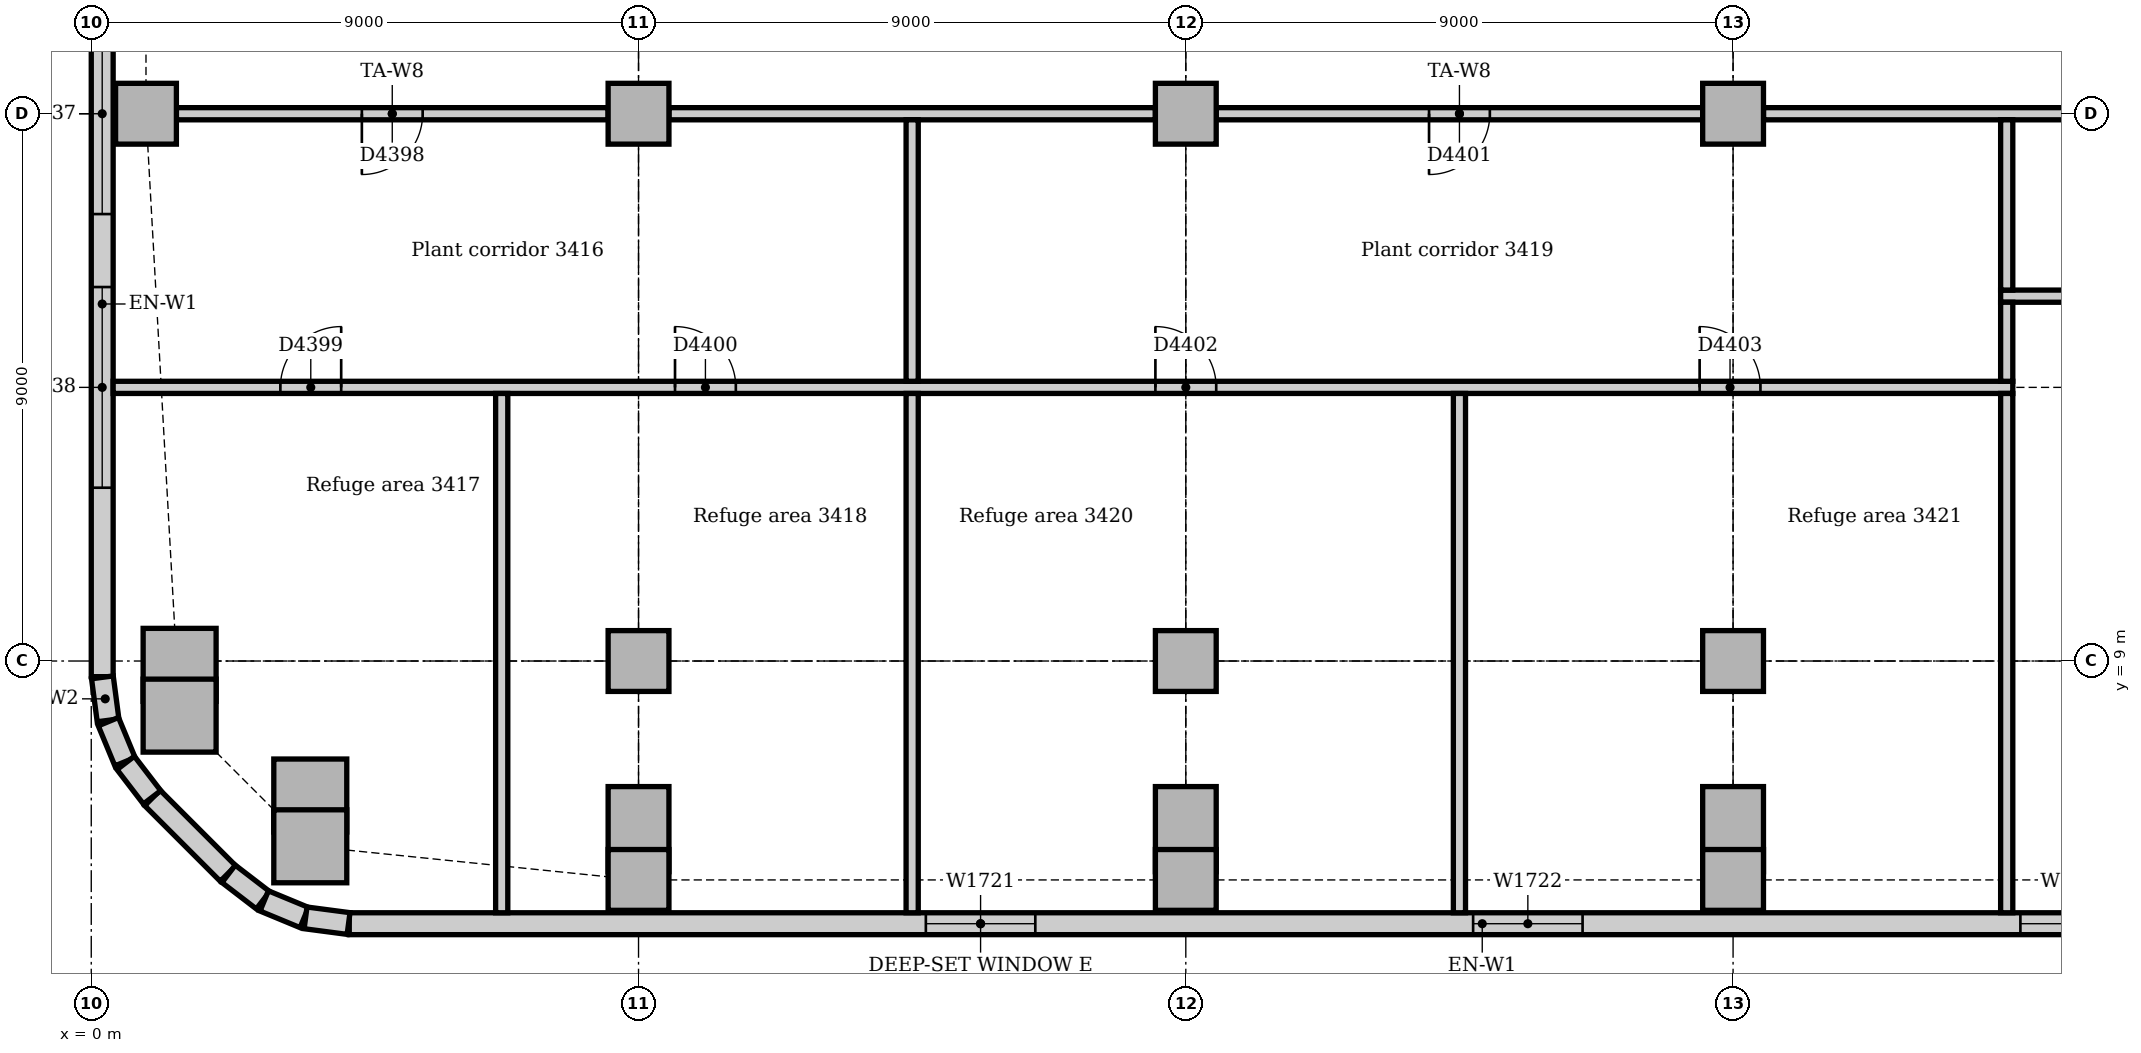
"""IFC4 building model, lengths in metres.
Left out: names, types, materials, properties, quantities, classifications, styles, units other than length and angle.
Written with IfcOpenShell. Run it as: python <this file> out.ifc"""

import sys

from ifc_helpers import new_model, si_unit, direction, frame, frame_2d, origin, origin_2d, place, context, subcontext, project, spatial, rectangle, extrude, element, fill, save


model = new_model("IFC4")
c1 = context("Model", 3, precision=1e-05, world=origin(), true_north=direction((0.0, 1.0)))
c2 = subcontext(c1, "Body", "Model", "MODEL_VIEW")
j1 = project(units=[si_unit("LENGTHUNIT", "METRE"), si_unit("PLANEANGLEUNIT", "RADIAN")], contexts=[c1])
p1 = place(None, origin())
s1 = spatial("IfcSite", under=j1, at=p1, CompositionType="ELEMENT")
p2 = place(p1, origin())
s2 = spatial("IfcBuilding", under=s1, at=p2, CompositionType="ELEMENT")
p3 = place(p2, frame((0.0, 0.0, 144.0)))
s3 = spatial("IfcBuildingStorey", under=s2, at=p3, CompositionType="ELEMENT", Elevation=144.0)
for number, where, z_axis, x_axis in (
    (1, (3.602, 5.953, 0.0), (0.0, 0.0, 1.0), (1.0, 0.0, 0.0)),
    (2, (1.453, 8.102, 0.0), (0.0, 0.0, 1.0), (1.0, 0.0, 0.0)),
):
    element("IfcColumn", number, at=place(p3, frame(where, z_axis=z_axis, x_axis=x_axis)), inside=s3, PredefinedType="COLUMN", context=c2, shape_type="SweptSolid", body=[
        extrude(rectangle(XDim=1.2, YDim=1.2, at=origin_2d()), origin(), (0.0, 0.0, 1.0), 4.85),
    ])
for number, where, z_axis, x_axis in (
    (3, (9.0, 5.4, 0.0), (0.0, 0.0, 1.0), (1.0, 0.0, 0.0)),
    (4, (18.0, 5.4, 0.0), (0.0, 0.0, 1.0), (1.0, 0.0, 0.0)),
    (5, (27.0, 5.4, 0.0), (0.0, 0.0, 1.0), (1.0, 0.0, 0.0)),
    (6, (0.9, 18.0, 0.0), (0.0, 0.0, 1.0), (1.0, 0.0, 0.0)),
    (7, (9.0, 9.0, 0.0), (0.0, 0.0, 1.0), (1.0, 0.0, 0.0)),
    (8, (9.0, 18.0, 0.0), (0.0, 0.0, 1.0), (1.0, 0.0, 0.0)),
    (9, (18.0, 9.0, 0.0), (0.0, 0.0, 1.0), (1.0, 0.0, 0.0)),
    (10, (18.0, 18.0, 0.0), (0.0, 0.0, 1.0), (1.0, 0.0, 0.0)),
    (11, (27.0, 9.0, 0.0), (0.0, 0.0, 1.0), (1.0, 0.0, 0.0)),
    (12, (27.0, 18.0, 0.0), (0.0, 0.0, 1.0), (1.0, 0.0, 0.0)),
):
    element("IfcColumn", number, at=place(p3, frame(where, z_axis=z_axis, x_axis=x_axis)), inside=s3, PredefinedType="COLUMN", context=c2, shape_type="SweptSolid", body=[
        extrude(rectangle(XDim=1.0, YDim=1.0, at=origin_2d()), origin(), (0.0, 0.0, 1.0), 4.85),
    ])
p4 = place(p3, frame((4.243, 4.68, 0.0), z_axis=(0.0, 0.0, 1.0), x_axis=(1.0, 0.0, 0.0)))
e13 = element("IfcWall", 13, at=p4, inside=s3, PredefinedType="STANDARD", context=c2, shape_type="SweptSolid", body=[
    extrude(rectangle(XDim=37.265, YDim=0.36, at=frame_2d((18.632, 0.0))), origin(), (0.0, 0.0, 1.0), 4.85),
])
p5 = place(p4, frame((9.482, 0.0, 0.9)))
e14 = element("IfcOpeningElement", 14, at=p5, cuts=e13, PredefinedType="OPENING", context=c2, shape_type="SweptSolid", body=[
    extrude(rectangle(XDim=1.8, YDim=2.2, at=frame_2d((0.9, 1.1))), frame((0.0, 0.19, 0.0), z_axis=(0.0, -1.0, 0.0), x_axis=(1.0, 0.0, 0.0)), (0.0, 0.0, 1.0), 0.38),
])
p6 = place(p4, frame((18.482, 0.0, 0.9)))
e15 = element("IfcOpeningElement", 15, at=p6, cuts=e13, PredefinedType="OPENING", context=c2, shape_type="SweptSolid", body=[
    extrude(rectangle(XDim=1.8, YDim=2.2, at=frame_2d((0.9, 1.1))), frame((0.0, 0.19, 0.0), z_axis=(0.0, -1.0, 0.0), x_axis=(1.0, 0.0, 0.0)), (0.0, 0.0, 1.0), 0.38),
])
p7 = place(p4, frame((27.482, 0.0, 0.9)))
e16 = element("IfcOpeningElement", 16, at=p7, cuts=e13, PredefinedType="OPENING", context=c2, shape_type="SweptSolid", body=[
    extrude(rectangle(XDim=1.8, YDim=2.2, at=frame_2d((0.9, 1.1))), frame((0.0, 0.19, 0.0), z_axis=(0.0, -1.0, 0.0), x_axis=(1.0, 0.0, 0.0)), (0.0, 0.0, 1.0), 0.38),
])
p8 = place(p4, frame((30.482, 0.0, 0.9)))
e17 = element("IfcOpeningElement", 17, at=p8, cuts=e13, PredefinedType="OPENING", context=c2, shape_type="SweptSolid", body=[
    extrude(rectangle(XDim=3.3, YDim=2.2, at=frame_2d((1.65, 1.1))), frame((0.0, 0.19, 0.0), z_axis=(0.0, -1.0, 0.0), x_axis=(1.0, 0.0, 0.0)), (0.0, 0.0, 1.0), 0.38),
])
p9 = place(p3, frame((0.18, 21.0, 0.0), z_axis=(0.0, 0.0, 1.0), x_axis=(0.0, -1.0, 0.0)))
e18 = element("IfcWall", 18, at=p9, inside=s3, PredefinedType="STANDARD", context=c2, shape_type="SweptSolid", body=[
    extrude(rectangle(XDim=12.257, YDim=0.36, at=frame_2d((6.129, 0.0))), origin(), (0.0, 0.0, 1.0), 4.85),
])
p10 = place(p9, frame((1.35, 0.0, 0.9)))
e19 = element("IfcOpeningElement", 19, at=p10, cuts=e18, PredefinedType="OPENING", context=c2, shape_type="SweptSolid", body=[
    extrude(rectangle(XDim=3.3, YDim=2.2, at=frame_2d((1.65, 1.1))), frame((0.0, 0.19, 0.0), z_axis=(0.0, -1.0, 0.0), x_axis=(1.0, 0.0, 0.0)), (0.0, 0.0, 1.0), 0.38),
])
p11 = place(p9, frame((5.85, 0.0, 0.9)))
e20 = element("IfcOpeningElement", 20, at=p11, cuts=e18, PredefinedType="OPENING", context=c2, shape_type="SweptSolid", body=[
    extrude(rectangle(XDim=3.3, YDim=2.2, at=frame_2d((1.65, 1.1))), frame((0.0, 0.19, 0.0), z_axis=(0.0, -1.0, 0.0), x_axis=(1.0, 0.0, 0.0)), (0.0, 0.0, 1.0), 0.38),
])
p12 = place(p3, frame((1.006, 6.749, 0.0), z_axis=(0.0, 0.0, 1.0), x_axis=(0.707106781187, -0.707106781187, 0.0)))
e21 = element("IfcWall", 21, at=p12, inside=s3, PredefinedType="STANDARD", context=c2, shape_type="SweptSolid", body=[
    extrude(rectangle(XDim=1.757, YDim=0.36, at=frame_2d((0.879, 0.0))), origin(), (0.0, 0.0, 1.0), 4.85),
])
for number, where, z_axis, x_axis in (
    (22, (0.183, 8.731, 0.0), (0.0, 0.0, 1.0), (0.131, -0.991, 0.0)),
    (23, (0.282, 8.003, 0.0), (0.0, 0.0, 1.0), (0.383, -0.924, 0.0)),
):
    element("IfcWall", number, at=place(p3, frame(where, z_axis=z_axis, x_axis=x_axis)), inside=s3, PredefinedType="STANDARD", context=c2, shape_type="SweptSolid", body=[
        extrude(rectangle(XDim=0.713, YDim=0.36, at=frame_2d((0.356, 0.0))), origin(), (0.0, 0.0, 1.0), 4.85),
    ])
for number, where, z_axis, x_axis in (
    (24, (0.566, 7.324, 0.0), (0.0, 0.0, 1.0), (0.609, -0.793, 0.0)),
    (25, (2.259, 5.5, 0.0), (0.0, 0.0, 1.0), (0.793, -0.609, 0.0)),
):
    element("IfcWall", number, at=place(p3, frame(where, z_axis=z_axis, x_axis=x_axis)), inside=s3, PredefinedType="STANDARD", context=c2, shape_type="SweptSolid", body=[
        extrude(rectangle(XDim=0.713, YDim=0.36, at=frame_2d((0.357, 0.0))), origin(), (0.0, 0.0, 1.0), 4.85),
    ])
for number, where, z_axis, x_axis in (
    (26, (2.844, 5.055, 0.0), (0.0, 0.0, 1.0), (0.924, -0.383, 0.0)),
    (27, (3.524, 4.776, 0.0), (0.0, 0.0, 1.0), (0.991, -0.131, 0.0)),
):
    element("IfcWall", number, at=place(p3, frame(where, z_axis=z_axis, x_axis=x_axis)), inside=s3, PredefinedType="STANDARD", context=c2, shape_type="SweptSolid", body=[
        extrude(rectangle(XDim=0.713, YDim=0.36, at=frame_2d((0.356, 0.0))), origin(), (0.0, 0.0, 1.0), 4.85),
    ])
p13 = place(p3, frame((27.5, 18.0, 0.0), z_axis=(0.0, 0.0, 1.0), x_axis=(1.0, 0.0, 0.0)))
e28 = element("IfcWall", 28, at=p13, inside=s3, PredefinedType="PARTITIONING", context=c2, shape_type="SweptSolid", body=[
    extrude(rectangle(XDim=8.0, YDim=0.2, at=frame_2d((4.0, 0.0))), origin(), (0.0, 0.0, 1.0), 4.262),
])
p14 = place(p3, frame((18.5, 18.0, 0.0), z_axis=(0.0, 0.0, 1.0), x_axis=(1.0, 0.0, 0.0)))
e29 = element("IfcWall", 29, at=p14, inside=s3, PredefinedType="PARTITIONING", context=c2, shape_type="SweptSolid", body=[
    extrude(rectangle(XDim=8.0, YDim=0.2, at=frame_2d((4.0, 0.0))), origin(), (0.0, 0.0, 1.0), 4.262),
])
p15 = place(p14, frame((3.5, 0.0, 0.0)))
e30 = element("IfcOpeningElement", 30, at=p15, cuts=e29, PredefinedType="OPENING", context=c2, shape_type="SweptSolid", body=[
    extrude(rectangle(XDim=1.0, YDim=2.1, at=frame_2d((0.5, 1.05))), frame((0.0, 0.11, 0.0), z_axis=(0.0, -1.0, 0.0), x_axis=(1.0, 0.0, 0.0)), (0.0, 0.0, 1.0), 0.22),
])
p16 = place(p3, frame((9.5, 18.0, 0.0), z_axis=(0.0, 0.0, 1.0), x_axis=(1.0, 0.0, 0.0)))
e31 = element("IfcWall", 31, at=p16, inside=s3, PredefinedType="PARTITIONING", context=c2, shape_type="SweptSolid", body=[
    extrude(rectangle(XDim=8.0, YDim=0.2, at=frame_2d((4.0, 0.0))), origin(), (0.0, 0.0, 1.0), 4.262),
])
p17 = place(p3, frame((1.4, 18.0, 0.0), z_axis=(0.0, 0.0, 1.0), x_axis=(1.0, 0.0, 0.0)))
e32 = element("IfcWall", 32, at=p17, inside=s3, PredefinedType="PARTITIONING", context=c2, shape_type="SweptSolid", body=[
    extrude(rectangle(XDim=7.1, YDim=0.2, at=frame_2d((3.55, 0.0))), origin(), (0.0, 0.0, 1.0), 4.262),
])
p18 = place(p17, frame((3.05, 0.0, 0.0)))
e33 = element("IfcOpeningElement", 33, at=p18, cuts=e32, PredefinedType="OPENING", context=c2, shape_type="SweptSolid", body=[
    extrude(rectangle(XDim=1.0, YDim=2.1, at=frame_2d((0.5, 1.05))), frame((0.0, 0.11, 0.0), z_axis=(0.0, -1.0, 0.0), x_axis=(1.0, 0.0, 0.0)), (0.0, 0.0, 1.0), 0.22),
])
p19 = place(p3, frame((0.36, 13.5, 0.0), z_axis=(0.0, 0.0, 1.0), x_axis=(1.0, 0.0, 0.0)))
e34 = element("IfcWall", 34, at=p19, inside=s3, PredefinedType="PARTITIONING", context=c2, shape_type="SweptSolid", body=[
    extrude(rectangle(XDim=31.24, YDim=0.2, at=frame_2d((15.62, 0.0))), origin(), (0.0, 0.0, 1.0), 4.4),
])
p20 = place(p19, frame((2.75, 0.0, 0.0)))
e35 = element("IfcOpeningElement", 35, at=p20, cuts=e34, PredefinedType="OPENING", context=c2, shape_type="SweptSolid", body=[
    extrude(rectangle(XDim=1.0, YDim=2.1, at=frame_2d((0.5, 1.05))), frame((0.0, 0.11, 0.0), z_axis=(0.0, -1.0, 0.0), x_axis=(1.0, 0.0, 0.0)), (0.0, 0.0, 1.0), 0.22),
])
p21 = place(p19, frame((9.24, 0.0, 0.0)))
e36 = element("IfcOpeningElement", 36, at=p21, cuts=e34, PredefinedType="OPENING", context=c2, shape_type="SweptSolid", body=[
    extrude(rectangle(XDim=1.0, YDim=2.1, at=frame_2d((0.5, 1.05))), frame((0.0, 0.11, 0.0), z_axis=(0.0, -1.0, 0.0), x_axis=(1.0, 0.0, 0.0)), (0.0, 0.0, 1.0), 0.22),
])
p22 = place(p19, frame((17.14, 0.0, 0.0)))
e37 = element("IfcOpeningElement", 37, at=p22, cuts=e34, PredefinedType="OPENING", context=c2, shape_type="SweptSolid", body=[
    extrude(rectangle(XDim=1.0, YDim=2.1, at=frame_2d((0.5, 1.05))), frame((0.0, 0.11, 0.0), z_axis=(0.0, -1.0, 0.0), x_axis=(1.0, 0.0, 0.0)), (0.0, 0.0, 1.0), 0.22),
])
p23 = place(p19, frame((26.09, 0.0, 0.0)))
e38 = element("IfcOpeningElement", 38, at=p23, cuts=e34, PredefinedType="OPENING", context=c2, shape_type="SweptSolid", body=[
    extrude(rectangle(XDim=1.0, YDim=2.1, at=frame_2d((0.5, 1.05))), frame((0.0, 0.11, 0.0), z_axis=(0.0, -1.0, 0.0), x_axis=(1.0, 0.0, 0.0)), (0.0, 0.0, 1.0), 0.22),
])
p24 = place(p3, frame((31.4, 15.0, 0.0), z_axis=(0.0, 0.0, 1.0), x_axis=(1.0, 0.0, 0.0)))
e39 = element("IfcWall", 39, at=p24, inside=s3, PredefinedType="PARTITIONING", context=c2, shape_type="SweptSolid", body=[
    extrude(rectangle(XDim=15.056, YDim=0.2, at=frame_2d((7.528, 0.0))), origin(), (0.0, 0.0, 1.0), 4.85),
])
p25 = place(p24, frame((3.0, 0.0, 0.0)))
e40 = element("IfcOpeningElement", 40, at=p25, cuts=e39, PredefinedType="OPENING", context=c2, shape_type="SweptSolid", body=[
    extrude(rectangle(XDim=1.0, YDim=2.1, at=frame_2d((0.5, 1.05))), frame((0.0, 0.11, 0.0), z_axis=(0.0, -1.0, 0.0), x_axis=(1.0, 0.0, 0.0)), (0.0, 0.0, 1.0), 0.22),
])
p26 = place(p24, frame((9.7, 0.0, 0.0)))
e41 = element("IfcOpeningElement", 41, at=p26, cuts=e39, PredefinedType="OPENING", context=c2, shape_type="SweptSolid", body=[
    extrude(rectangle(XDim=1.0, YDim=2.1, at=frame_2d((0.5, 1.05))), frame((0.0, 0.11, 0.0), z_axis=(0.0, -1.0, 0.0), x_axis=(1.0, 0.0, 0.0)), (0.0, 0.0, 1.0), 0.22),
])
p27 = place(p3, frame((13.5, 13.6, 0.0), z_axis=(0.0, 0.0, 1.0), x_axis=(0.0, 1.0, 0.0)))
e42 = element("IfcWall", 42, at=p27, inside=s3, PredefinedType="PARTITIONING", context=c2, shape_type="SweptSolid", body=[
    extrude(rectangle(XDim=4.3, YDim=0.2, at=frame_2d((2.15, 0.0))), origin(), (0.0, 0.0, 1.0), 4.85),
])
p28 = place(p3, frame((13.5, 4.86, 0.0), z_axis=(0.0, 0.0, 1.0), x_axis=(0.0, 1.0, 0.0)))
e43 = element("IfcWall", 43, at=p28, inside=s3, PredefinedType="PARTITIONING", context=c2, shape_type="SweptSolid", body=[
    extrude(rectangle(XDim=8.54, YDim=0.2, at=frame_2d((4.27, 0.0))), origin(), (0.0, 0.0, 1.0), 4.85),
])
p29 = place(p3, frame((31.5, 15.1, 0.0), z_axis=(0.0, 0.0, 1.0), x_axis=(0.0, 1.0, 0.0)))
e44 = element("IfcWall", 44, at=p29, inside=s3, PredefinedType="PARTITIONING", context=c2, shape_type="SweptSolid", body=[
    extrude(rectangle(XDim=2.8, YDim=0.2, at=frame_2d((1.4, 0.0))), origin(), (0.0, 0.0, 1.0), 4.85),
])
p30 = place(p3, frame((31.5, 13.6, 0.0), z_axis=(0.0, 0.0, 1.0), x_axis=(0.0, 1.0, 0.0)))
e45 = element("IfcWall", 45, at=p30, inside=s3, PredefinedType="PARTITIONING", context=c2, shape_type="SweptSolid", body=[
    extrude(rectangle(XDim=1.3, YDim=0.2, at=frame_2d((0.65, 0.0))), origin(), (0.0, 0.0, 1.0), 4.85),
])
for number, where, z_axis, x_axis in (
    (46, (31.5, 4.86, 0.0), (0.0, 0.0, 1.0), (0.0, 1.0, 0.0)),
    (47, (6.75, 4.86, 0.0), (0.0, 0.0, 1.0), (0.0, 1.0, 0.0)),
    (48, (22.5, 4.86, 0.0), (0.0, 0.0, 1.0), (0.0, 1.0, 0.0)),
):
    element("IfcWall", number, at=place(p3, frame(where, z_axis=z_axis, x_axis=x_axis)), inside=s3, PredefinedType="PARTITIONING", context=c2, shape_type="SweptSolid", body=[
        extrude(rectangle(XDim=8.54, YDim=0.2, at=frame_2d((4.27, 0.0))), origin(), (0.0, 0.0, 1.0), 4.85),
    ])
p31 = place(p5, origin())
e49 = element("IfcWindow", 49, at=p31, inside=s3, PartitioningType="SINGLE_PANEL", PredefinedType="WINDOW", context=c2, shape_type="SweptSolid", body=[
    extrude(rectangle(XDim=1.8, YDim=2.2, at=frame_2d((0.9, 1.1))), frame((0.0, 0.13, 0.0), z_axis=(0.0, -1.0, 0.0), x_axis=(1.0, 0.0, 0.0)), (0.0, 0.0, 1.0), 0.06),
])
fill(e14, e49)
p32 = place(p6, origin())
e50 = element("IfcWindow", 50, at=p32, inside=s3, PartitioningType="SINGLE_PANEL", PredefinedType="WINDOW", context=c2, shape_type="SweptSolid", body=[
    extrude(rectangle(XDim=1.8, YDim=2.2, at=frame_2d((0.9, 1.1))), frame((0.0, 0.13, 0.0), z_axis=(0.0, -1.0, 0.0), x_axis=(1.0, 0.0, 0.0)), (0.0, 0.0, 1.0), 0.06),
])
fill(e15, e50)
p33 = place(p7, origin())
e51 = element("IfcWindow", 51, at=p33, inside=s3, PartitioningType="SINGLE_PANEL", PredefinedType="WINDOW", context=c2, shape_type="SweptSolid", body=[
    extrude(rectangle(XDim=1.8, YDim=2.2, at=frame_2d((0.9, 1.1))), frame((0.0, 0.13, 0.0), z_axis=(0.0, -1.0, 0.0), x_axis=(1.0, 0.0, 0.0)), (0.0, 0.0, 1.0), 0.06),
])
fill(e16, e51)
p34 = place(p10, origin())
e52 = element("IfcWindow", 52, at=p34, inside=s3, PartitioningType="SINGLE_PANEL", PredefinedType="WINDOW", context=c2, shape_type="SweptSolid", body=[
    extrude(rectangle(XDim=3.3, YDim=2.2, at=frame_2d((1.65, 1.1))), frame((0.0, 0.13, 0.0), z_axis=(0.0, -1.0, 0.0), x_axis=(1.0, 0.0, 0.0)), (0.0, 0.0, 1.0), 0.06),
])
fill(e19, e52)
p35 = place(p11, origin())
e53 = element("IfcWindow", 53, at=p35, inside=s3, PartitioningType="SINGLE_PANEL", PredefinedType="WINDOW", context=c2, shape_type="SweptSolid", body=[
    extrude(rectangle(XDim=3.3, YDim=2.2, at=frame_2d((1.65, 1.1))), frame((0.0, 0.13, 0.0), z_axis=(0.0, -1.0, 0.0), x_axis=(1.0, 0.0, 0.0)), (0.0, 0.0, 1.0), 0.06),
])
fill(e20, e53)
p36 = place(p18, frame((1.0, 0.0, 0.0), z_axis=(0.0, 0.0, 1.0), x_axis=(-1.0, 0.0, 0.0)))
e54 = element("IfcDoor", 54, at=p36, inside=s3, OperationType="SINGLE_SWING_RIGHT", PredefinedType="DOOR", context=c2, shape_type="SweptSolid", body=[
    extrude(rectangle(XDim=1.0, YDim=2.1, at=frame_2d((0.5, 1.05))), frame((0.0, 0.025, 0.0), z_axis=(0.0, -1.0, 0.0), x_axis=(1.0, 0.0, 0.0)), (0.0, 0.0, 1.0), 0.05),
])
fill(e33, e54)
p37 = place(p20, origin())
e55 = element("IfcDoor", 55, at=p37, inside=s3, OperationType="SINGLE_SWING_RIGHT", PredefinedType="DOOR", context=c2, shape_type="SweptSolid", body=[
    extrude(rectangle(XDim=1.0, YDim=2.1, at=frame_2d((0.5, 1.05))), frame((0.0, 0.025, 0.0), z_axis=(0.0, -1.0, 0.0), x_axis=(1.0, 0.0, 0.0)), (0.0, 0.0, 1.0), 0.05),
])
fill(e35, e55)
p38 = place(p21, origin())
e56 = element("IfcDoor", 56, at=p38, inside=s3, OperationType="SINGLE_SWING_LEFT", PredefinedType="DOOR", context=c2, shape_type="SweptSolid", body=[
    extrude(rectangle(XDim=1.0, YDim=2.1, at=frame_2d((0.5, 1.05))), frame((0.0, 0.025, 0.0), z_axis=(0.0, -1.0, 0.0), x_axis=(1.0, 0.0, 0.0)), (0.0, 0.0, 1.0), 0.05),
])
fill(e36, e56)
p39 = place(p15, frame((1.0, 0.0, 0.0), z_axis=(0.0, 0.0, 1.0), x_axis=(-1.0, 0.0, 0.0)))
e57 = element("IfcDoor", 57, at=p39, inside=s3, OperationType="SINGLE_SWING_RIGHT", PredefinedType="DOOR", context=c2, shape_type="SweptSolid", body=[
    extrude(rectangle(XDim=1.0, YDim=2.1, at=frame_2d((0.5, 1.05))), frame((0.0, 0.025, 0.0), z_axis=(0.0, -1.0, 0.0), x_axis=(1.0, 0.0, 0.0)), (0.0, 0.0, 1.0), 0.05),
])
fill(e30, e57)
p40 = place(p22, origin())
e58 = element("IfcDoor", 58, at=p40, inside=s3, OperationType="SINGLE_SWING_LEFT", PredefinedType="DOOR", context=c2, shape_type="SweptSolid", body=[
    extrude(rectangle(XDim=1.0, YDim=2.1, at=frame_2d((0.5, 1.05))), frame((0.0, 0.025, 0.0), z_axis=(0.0, -1.0, 0.0), x_axis=(1.0, 0.0, 0.0)), (0.0, 0.0, 1.0), 0.05),
])
fill(e37, e58)
p41 = place(p23, origin())
e59 = element("IfcDoor", 59, at=p41, inside=s3, OperationType="SINGLE_SWING_LEFT", PredefinedType="DOOR", context=c2, shape_type="SweptSolid", body=[
    extrude(rectangle(XDim=1.0, YDim=2.1, at=frame_2d((0.5, 1.05))), frame((0.0, 0.025, 0.0), z_axis=(0.0, -1.0, 0.0), x_axis=(1.0, 0.0, 0.0)), (0.0, 0.0, 1.0), 0.05),
])
fill(e38, e59)
save(model, sys.argv[1])
